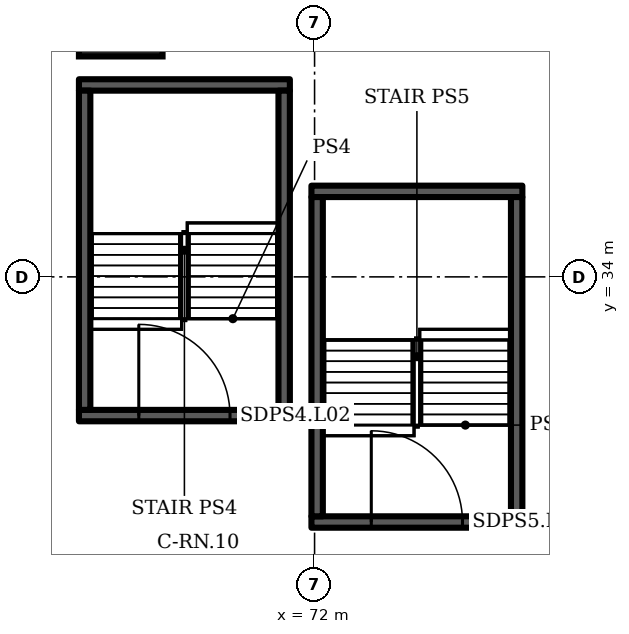
"""IFC4 building model, lengths in metres.
Left out: names, types, materials, properties, quantities, classifications, styles, units other than length and angle.
Written with IfcOpenShell. Run it as: python <this file> out.ifc"""

import sys

from ifc_helpers import new_model, si_unit, direction, frame, frame_2d, origin, origin_2d, place, context, subcontext, project, spatial, rectangle, extrude, element, fill, save


model = new_model("IFC4")
c1 = context("Model", 3, precision=1e-05, world=origin(), true_north=direction((0.0, 1.0)))
c2 = subcontext(c1, "Body", "Model", "MODEL_VIEW")
j1 = project(units=[si_unit("LENGTHUNIT", "METRE"), si_unit("PLANEANGLEUNIT", "RADIAN")], contexts=[c1])
p1 = place(None, origin())
s1 = spatial("IfcSite", under=j1, at=p1, CompositionType="ELEMENT")
p2 = place(p1, origin())
s2 = spatial("IfcBuilding", under=s1, at=p2, CompositionType="ELEMENT")
p3 = place(p2, frame((0.0, 0.0, 15.0)))
s3 = spatial("IfcBuildingStorey", under=s2, at=p3, CompositionType="ELEMENT", Elevation=15.0)
p4 = place(p3, frame((66.9, 40.9, 0.0), z_axis=(0.0, 0.0, 1.0), x_axis=(1.0, 0.0, 0.0)))
e1 = element("IfcColumn", 1, at=p4, inside=s3, PredefinedType="COLUMN", context=c2, shape_type="SweptSolid", body=[
    extrude(rectangle(XDim=2.2, YDim=2.2, at=origin_2d()), origin(), (0.0, 0.0, 1.0), 6.5),
])
p5 = place(p3, frame((65.8, 30.35, 0.0), z_axis=(0.0, 0.0, 1.0), x_axis=(1.0, 0.0, 0.0)))
e2 = element("IfcWall", 2, at=p5, inside=s3, PredefinedType="SHEAR", context=c2, shape_type="SweptSolid", body=[
    extrude(rectangle(XDim=5.55, YDim=0.3, at=frame_2d((2.775, 0.0))), origin(), (0.0, 0.0, 1.0), 6.2),
])
p6 = place(p5, frame((1.575, 0.0, 0.0)))
e3 = element("IfcOpeningElement", 3, at=p6, cuts=e2, PredefinedType="OPENING", context=c2, shape_type="SweptSolid", body=[
    extrude(rectangle(XDim=2.4, YDim=2.1, at=frame_2d((1.2, 1.05))), frame((0.0, 0.16, 0.0), z_axis=(0.0, -1.0, 0.0), x_axis=(1.0, 0.0, 0.0)), (0.0, 0.0, 1.0), 0.32),
])
p7 = place(p3, frame((65.8, 39.05, 0.0), z_axis=(0.0, 0.0, 1.0), x_axis=(1.0, 0.0, 0.0)))
e4 = element("IfcWall", 4, at=p7, inside=s3, PredefinedType="SHEAR", context=c2, shape_type="SweptSolid", body=[
    extrude(rectangle(XDim=5.55, YDim=0.3, at=frame_2d((2.775, 0.0))), origin(), (0.0, 0.0, 1.0), 6.2),
])
for number, where, z_axis, x_axis in (
    (5, (65.95, 30.5, 0.0), (0.0, 0.0, 1.0), (0.0, 1.0, 0.0)),
    (6, (71.2, 30.5, 0.0), (0.0, 0.0, 1.0), (0.0, 1.0, 0.0)),
):
    element("IfcWall", number, at=place(p3, frame(where, z_axis=z_axis, x_axis=x_axis)), inside=s3, PredefinedType="SHEAR", context=c2, shape_type="SweptSolid", body=[
        extrude(rectangle(XDim=8.4, YDim=0.3, at=frame_2d((4.2, 0.0))), origin(), (0.0, 0.0, 1.0), 6.2),
    ])
p8 = place(p3, frame((71.917, 27.55, 0.0), z_axis=(0.0, 0.0, 1.0), x_axis=(1.0, 0.0, 0.0)))
e7 = element("IfcWall", 7, at=p8, inside=s3, PredefinedType="SHEAR", context=c2, shape_type="SweptSolid", body=[
    extrude(rectangle(XDim=5.55, YDim=0.3, at=frame_2d((2.775, 0.0))), origin(), (0.0, 0.0, 1.0), 6.2),
])
p9 = place(p8, frame((1.575, 0.0, 0.0)))
e8 = element("IfcOpeningElement", 8, at=p9, cuts=e7, PredefinedType="OPENING", context=c2, shape_type="SweptSolid", body=[
    extrude(rectangle(XDim=2.4, YDim=2.1, at=frame_2d((1.2, 1.05))), frame((0.0, 0.16, 0.0), z_axis=(0.0, -1.0, 0.0), x_axis=(1.0, 0.0, 0.0)), (0.0, 0.0, 1.0), 0.32),
])
p10 = place(p3, frame((71.917, 36.25, 0.0), z_axis=(0.0, 0.0, 1.0), x_axis=(1.0, 0.0, 0.0)))
e9 = element("IfcWall", 9, at=p10, inside=s3, PredefinedType="SHEAR", context=c2, shape_type="SweptSolid", body=[
    extrude(rectangle(XDim=5.55, YDim=0.3, at=frame_2d((2.775, 0.0))), origin(), (0.0, 0.0, 1.0), 6.2),
])
for number, where, z_axis, x_axis in (
    (10, (72.067, 27.7, 0.0), (0.0, 0.0, 1.0), (0.0, 1.0, 0.0)),
    (11, (77.317, 27.7, 0.0), (0.0, 0.0, 1.0), (0.0, 1.0, 0.0)),
):
    element("IfcWall", number, at=place(p3, frame(where, z_axis=z_axis, x_axis=x_axis)), inside=s3, PredefinedType="SHEAR", context=c2, shape_type="SweptSolid", body=[
        extrude(rectangle(XDim=8.4, YDim=0.3, at=frame_2d((4.2, 0.0))), origin(), (0.0, 0.0, 1.0), 6.2),
    ])
p11 = place(p6, origin())
e12 = element("IfcDoor", 12, at=p11, inside=s3, OperationType="DOUBLE_DOOR_SINGLE_SWING", PredefinedType="DOOR", context=c2, shape_type="SweptSolid", body=[
    extrude(rectangle(XDim=2.4, YDim=2.1, at=frame_2d((1.2, 1.05))), frame((0.0, 0.025, 0.0), z_axis=(0.0, -1.0, 0.0), x_axis=(1.0, 0.0, 0.0)), (0.0, 0.0, 1.0), 0.05),
])
fill(e3, e12)
p12 = place(p9, origin())
e13 = element("IfcDoor", 13, at=p12, inside=s3, OperationType="DOUBLE_DOOR_SINGLE_SWING", PredefinedType="DOOR", context=c2, shape_type="SweptSolid", body=[
    extrude(rectangle(XDim=2.4, YDim=2.1, at=frame_2d((1.2, 1.05))), frame((0.0, 0.025, 0.0), z_axis=(0.0, -1.0, 0.0), x_axis=(1.0, 0.0, 0.0)), (0.0, 0.0, 1.0), 0.05),
])
fill(e8, e13)
save(model, sys.argv[1])
